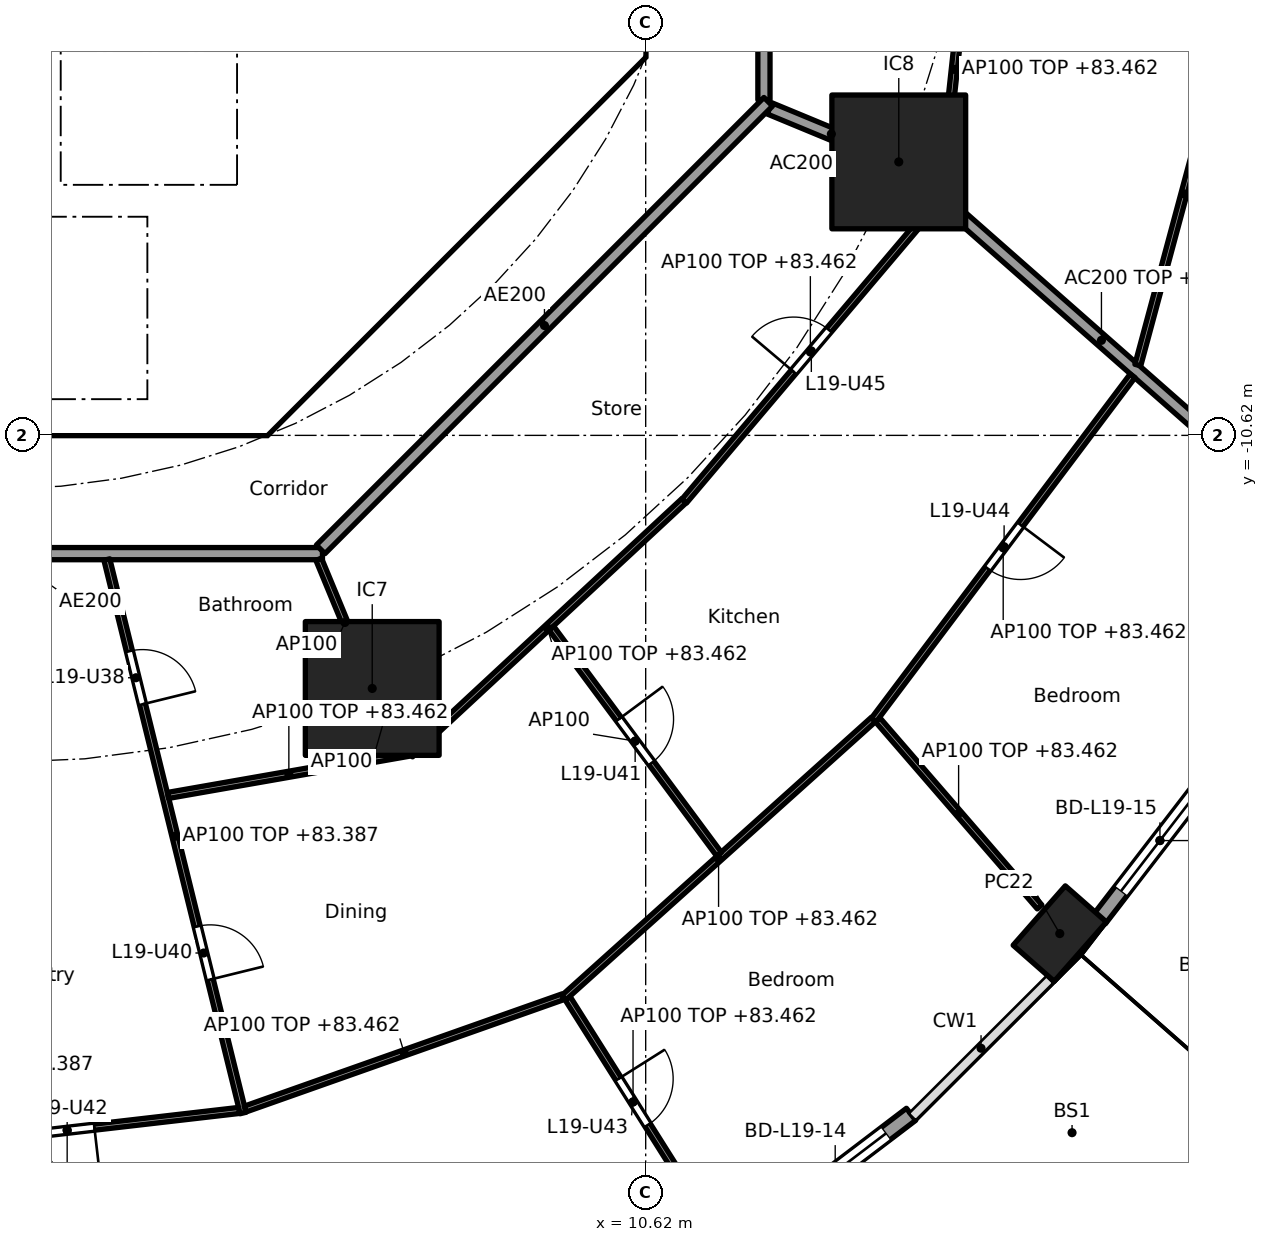
"""IFC4 building model, lengths in metres.
Left out: names, types, materials, properties, quantities, classifications, styles, units other than length and angle.
Written with IfcOpenShell. Run it as: python <this file> out.ifc"""

import sys

from ifc_helpers import new_model, si_unit, direction, frame, frame_2d, origin, origin_2d, place, context, subcontext, project, spatial, polyline, rectangle, hollow_rectangle, outline, extrude, element, fill, save


model = new_model("IFC4")
c1 = context("Model", 3, precision=1e-05, world=origin(), true_north=direction((0.0, 1.0)))
c2 = subcontext(c1, "Body", "Model", "MODEL_VIEW")
j1 = project(units=[si_unit("LENGTHUNIT", "METRE"), si_unit("PLANEANGLEUNIT", "RADIAN")], contexts=[c1])
p1 = place(None, origin())
s1 = spatial("IfcSite", under=j1, at=p1, CompositionType="ELEMENT")
p2 = place(p1, origin())
s2 = spatial("IfcBuilding", under=s1, at=p2, CompositionType="ELEMENT")
p3 = place(p2, frame((0.0, 0.0, 80.7)))
s3 = spatial("IfcBuildingStorey", under=s2, at=p3, CompositionType="ELEMENT", Elevation=80.7)
p4 = place(p3, frame((17.43, -18.813, 0.0), z_axis=(0.0, 0.0, 1.0), x_axis=(0.660114607735, 0.751164898445, 0.0)))
e1 = element("IfcColumn", 1, at=p4, inside=s3, PredefinedType="COLUMN", context=c2, shape_type="SweptSolid", body=[
    extrude(hollow_rectangle(XDim=1.3, YDim=0.9, WallThickness=0.045, at=origin_2d()), origin(), (0.0, 0.0, 1.0), 3.7),
])
for number, where, z_axis, x_axis in (
    (2, (6.123, -14.782, 0.0), (0.0, 0.0, 1.0), (1.0, 0.0, 0.0)),
    (3, (14.782, -6.123, 0.0), (0.0, 0.0, 1.0), (1.0, 0.0, 0.0)),
):
    element("IfcColumn", number, at=place(p3, frame(where, z_axis=z_axis, x_axis=x_axis)), inside=s3, PredefinedType="COLUMN", context=c2, shape_type="SweptSolid", body=[
        extrude(rectangle(XDim=2.2, YDim=2.2, at=origin_2d()), origin(), (0.0, 0.0, 1.0), 3.7),
    ])
p5 = place(p3, frame((14.984, -21.785, 0.0), z_axis=(0.0, 0.0, 1.0), x_axis=(-0.796037575978, -0.605247203736, 0.0)))
e4 = element("IfcWall", 4, at=p5, inside=s3, PredefinedType="SOLIDWALL", context=c2, shape_type="SweptSolid", body=[
    extrude(rectangle(XDim=3.134, YDim=0.25, at=frame_2d((1.567, 0.0))), origin(), (0.0, 0.0, 1.0), 3.44),
])
p6 = place(p5, frame((0.517, 0.0, 0.0)))
e5 = element("IfcOpeningElement", 5, at=p6, cuts=e4, PredefinedType="OPENING", context=c2, shape_type="SweptSolid", body=[
    extrude(rectangle(XDim=2.1, YDim=2.4, at=frame_2d((1.05, 1.2))), frame((0.0, 0.135, 0.0), z_axis=(0.0, -1.0, 0.0), x_axis=(1.0, 0.0, 0.0)), (0.0, 0.0, 1.0), 0.27),
])
p7 = place(p3, frame((20.073, -15.991, 0.0), z_axis=(0.0, 0.0, 1.0), x_axis=(-0.610458970322, -0.792047880847, 0.0)))
e6 = element("IfcWall", 6, at=p7, inside=s3, PredefinedType="SOLIDWALL", context=c2, shape_type="SweptSolid", body=[
    extrude(rectangle(XDim=3.263, YDim=0.25, at=frame_2d((1.631, 0.0))), origin(), (0.0, 0.0, 1.0), 3.44),
])
p8 = place(p7, frame((0.582, 0.0, 0.0)))
e7 = element("IfcOpeningElement", 7, at=p8, cuts=e6, PredefinedType="OPENING", context=c2, shape_type="SweptSolid", body=[
    extrude(rectangle(XDim=2.1, YDim=2.4, at=frame_2d((1.05, 1.2))), frame((0.0, 0.135, 0.0), z_axis=(0.0, -1.0, 0.0), x_axis=(1.0, 0.0, 0.0)), (0.0, 0.0, 1.0), 0.27),
])
p9 = place(p3, frame((4.613, -9.988, 0.0), z_axis=(0.0, 0.0, 1.0), x_axis=(0.707106781187, 0.707106781187, 0.0)))
e8 = element("IfcWall", 8, at=p9, inside=s3, PredefinedType="SHEAR", context=c2, shape_type="SweptSolid", body=[
    extrude(rectangle(XDim=7.602, YDim=0.6, at=frame_2d((3.801, 0.0))), origin(), (0.0, 0.0, 1.0), 3.44),
])
p10 = place(p9, frame((3.201, 0.0, 0.0)))
e9 = element("IfcOpeningElement", 9, at=p10, cuts=e8, PredefinedType="OPENING", context=c2, shape_type="SweptSolid", body=[
    extrude(rectangle(XDim=1.2, YDim=2.1, at=frame_2d((0.6, 1.05))), frame((0.0, 0.31, 0.0), z_axis=(0.0, -1.0, 0.0), x_axis=(1.0, 0.0, 0.0)), (0.0, 0.0, 1.0), 0.62),
])
p11 = place(p3, frame((4.0, -10.025, 0.0), z_axis=(0.0, 0.0, 1.0), x_axis=(0.0, 1.0, 0.0)))
e10 = element("IfcWall", 10, at=p11, inside=s3, PredefinedType="SOLIDWALL", context=c2, shape_type="SweptSolid", body=[
    extrude(rectangle(XDim=3.0, YDim=0.2, at=frame_2d((1.5, 0.0))), origin(), (0.0, 0.0, 1.0), 3.44),
])
p12 = place(p11, frame((0.975, 0.0, 0.0)))
e11 = element("IfcOpeningElement", 11, at=p12, cuts=e10, PredefinedType="OPENING", context=c2, shape_type="SweptSolid", body=[
    extrude(rectangle(XDim=1.1, YDim=2.1, at=frame_2d((0.55, 1.05))), frame((0.0, 0.11, 0.0), z_axis=(0.0, -1.0, 0.0), x_axis=(1.0, 0.0, 0.0)), (0.0, 0.0, 1.0), 0.22),
])
p13 = place(p3, frame((4.0, -6.5, 0.0), z_axis=(0.0, 0.0, 1.0), x_axis=(0.0, 1.0, 0.0)))
e12 = element("IfcWall", 12, at=p13, inside=s3, PredefinedType="SOLIDWALL", context=c2, shape_type="SweptSolid", body=[
    extrude(rectangle(XDim=2.2, YDim=0.2, at=frame_2d((1.1, 0.0))), origin(), (0.0, 0.0, 1.0), 3.44),
])
p14 = place(p13, frame((0.55, 0.0, 0.0)))
e13 = element("IfcOpeningElement", 13, at=p14, cuts=e12, PredefinedType="OPENING", context=c2, shape_type="SweptSolid", body=[
    extrude(rectangle(XDim=1.1, YDim=2.1, at=frame_2d((0.55, 1.05))), frame((0.0, 0.11, 0.0), z_axis=(0.0, -1.0, 0.0), x_axis=(1.0, 0.0, 0.0)), (0.0, 0.0, 1.0), 0.22),
])
p15 = place(p3, origin())
e14 = element("IfcWall", 14, at=p15, inside=s3, PredefinedType="SHEAR", context=c2, shape_type="SweptSolid", body=[
    extrude(outline(polyline([(-4.152, -10.025), (4.152, -10.025), (4.401, -9.776), (4.825, -10.2), (4.401, -10.625), (-4.401, -10.625), (-4.825, -10.2), (-4.401, -9.776), (-4.152, -10.025)])), origin(), (0.0, 0.0, 1.0), 3.44),
])
p16 = place(p3, origin())
e15 = element("IfcWall", 15, at=p16, inside=s3, PredefinedType="SHEAR", context=c2, shape_type="SweptSolid", body=[
    extrude(outline(polyline([(9.776, -4.401), (10.025, -4.152), (10.025, -3.801), (10.025, 4.152), (9.776, 4.401), (10.2, 4.825), (10.625, 4.401), (10.625, -4.401), (10.2, -4.825), (9.776, -4.401)])), origin(), (0.0, 0.0, 1.0), 3.44),
])
p17 = place(p3, frame((0.9, -6.5, 0.0), z_axis=(0.0, 0.0, 1.0), x_axis=(0.0, 1.0, 0.0)))
e16 = element("IfcWall", 16, at=p17, inside=s3, PredefinedType="SOLIDWALL", context=c2, shape_type="SweptSolid", body=[
    extrude(rectangle(XDim=2.2, YDim=0.2, at=frame_2d((1.1, 0.0))), origin(), (0.0, 0.0, 1.0), 3.44),
])
p18 = place(p3, origin())
e17 = element("IfcWall", 17, at=p18, inside=s3, PredefinedType="SOLIDWALL", context=c2, shape_type="SweptSolid", body=[
    extrude(outline(polyline([(4.1, -7.025), (-4.1, -7.025), (-4.1, -6.5), (4.1, -6.5), (4.1, -7.025)])), origin(), (0.0, 0.0, 1.0), 3.44),
])
p19 = place(p3, frame((12.657, -5.243, 0.0), z_axis=(0.0, 0.0, 1.0), x_axis=(0.923876145736, -0.382691608661, 0.0)))
e18 = element("IfcWall", 18, at=p19, inside=s3, PredefinedType="PARTITIONING", context=c2, shape_type="SweptSolid", body=[
    extrude(rectangle(XDim=2.2, YDim=0.2, at=frame_2d((1.1, 0.0))), origin(), (0.0, 0.0, 1.0), 3.44),
])
p20 = place(p3, frame((14.82, -6.156, 0.0), z_axis=(0.0, 0.0, 1.0), x_axis=(0.750582231659, -0.660777052808, 0.0)))
e19 = element("IfcWall", 19, at=p20, inside=s3, PredefinedType="PARTITIONING", context=c2, shape_type="SweptSolid", body=[
    extrude(rectangle(XDim=8.781, YDim=0.2, at=frame_2d((4.391, 0.0))), origin(), (0.0, 0.0, 1.0), 2.762),
])
p21 = place(p3, frame((12.565, -5.104, 0.0), z_axis=(0.0, 0.0, 1.0), x_axis=(0.0, 1.0, 0.0)))
e20 = element("IfcWall", 20, at=p21, inside=s3, PredefinedType="PARTITIONING", context=c2, shape_type="SweptSolid", body=[
    extrude(rectangle(XDim=10.209, YDim=0.2, at=frame_2d((5.104, 0.0))), origin(), (0.0, 0.0, 1.0), 3.44),
])
p22 = place(p21, frame((6.339, 0.0, 0.0)))
e21 = element("IfcOpeningElement", 21, at=p22, cuts=e20, PredefinedType="OPENING", context=c2, shape_type="SweptSolid", body=[
    extrude(rectangle(XDim=1.0, YDim=2.1, at=frame_2d((0.5, 1.05))), frame((0.0, 0.11, 0.0), z_axis=(0.0, -1.0, 0.0), x_axis=(1.0, 0.0, 0.0)), (0.0, 0.0, 1.0), 0.22),
])
p23 = place(p3, frame((-5.104, -12.565, 0.0), z_axis=(0.0, 0.0, 1.0), x_axis=(1.0, 0.0, 0.0)))
e22 = element("IfcWall", 22, at=p23, inside=s3, PredefinedType="PARTITIONING", context=c2, shape_type="SweptSolid", body=[
    extrude(rectangle(XDim=10.409, YDim=0.2, at=frame_2d((5.205, 0.0))), origin(), (0.0, 0.0, 1.0), 3.44),
])
p24 = place(p23, frame((4.604, 0.0, 0.0)))
e23 = element("IfcOpeningElement", 23, at=p24, cuts=e22, PredefinedType="OPENING", context=c2, shape_type="SweptSolid", body=[
    extrude(rectangle(XDim=1.0, YDim=2.1, at=frame_2d((0.5, 1.05))), frame((0.0, 0.11, 0.0), z_axis=(0.0, -1.0, 0.0), x_axis=(1.0, 0.0, 0.0)), (0.0, 0.0, 1.0), 0.22),
])
p25 = place(p3, frame((5.275, -12.494, 0.0), z_axis=(0.0, 0.0, 1.0), x_axis=(0.707106781187, 0.707106781187, 0.0)))
e24 = element("IfcWall", 24, at=p25, inside=s3, PredefinedType="PARTITIONING", context=c2, shape_type="SweptSolid", body=[
    extrude(rectangle(XDim=10.409, YDim=0.2, at=frame_2d((5.205, 0.0))), origin(), (0.0, 0.0, 1.0), 3.44),
])
p26 = place(p3, frame((-1.726, -22.375, 0.0), z_axis=(0.0, 0.0, 1.0), x_axis=(0.99339223329, 0.114768771187, 0.0)))
e25 = element("IfcWall", 25, at=p26, inside=s3, PredefinedType="PARTITIONING", context=c2, shape_type="SweptSolid", body=[
    extrude(rectangle(XDim=5.701, YDim=0.1, at=frame_2d((2.851, 0.0))), origin(), (0.0, 0.0, 1.0), 2.762),
])
p27 = place(p26, frame((2.4, 0.0, 0.0)))
e26 = element("IfcOpeningElement", 26, at=p27, cuts=e25, PredefinedType="OPENING", context=c2, shape_type="SweptSolid", body=[
    extrude(rectangle(XDim=0.9, YDim=2.1, at=frame_2d((0.45, 1.05))), frame((0.0, 0.06, 0.0), z_axis=(0.0, -1.0, 0.0), x_axis=(1.0, 0.0, 0.0)), (0.0, 0.0, 1.0), 0.12),
])
p28 = place(p3, frame((1.759, -12.662, 0.0), z_axis=(0.0, 0.0, 1.0), x_axis=(0.239022447434, -0.971014041929, 0.0)))
e27 = element("IfcWall", 27, at=p28, inside=s3, PredefinedType="PARTITIONING", context=c2, shape_type="SweptSolid", body=[
    extrude(rectangle(XDim=9.374, YDim=0.1, at=frame_2d((4.687, 0.0))), origin(), (0.0, 0.0, 1.0), 2.687),
])
p29 = place(p28, frame((1.552, 0.0, 0.0)))
e28 = element("IfcOpeningElement", 28, at=p29, cuts=e27, PredefinedType="OPENING", context=c2, shape_type="SweptSolid", body=[
    extrude(rectangle(XDim=0.9, YDim=2.1, at=frame_2d((0.45, 1.05))), frame((0.0, 0.06, 0.0), z_axis=(0.0, -1.0, 0.0), x_axis=(1.0, 0.0, 0.0)), (0.0, 0.0, 1.0), 0.12),
])
p30 = place(p28, frame((6.214, 0.0, 0.0)))
e29 = element("IfcOpeningElement", 29, at=p30, cuts=e27, PredefinedType="OPENING", context=c2, shape_type="SweptSolid", body=[
    extrude(rectangle(XDim=0.9, YDim=2.1, at=frame_2d((0.45, 1.05))), frame((0.0, 0.06, 0.0), z_axis=(0.0, -1.0, 0.0), x_axis=(1.0, 0.0, 0.0)), (0.0, 0.0, 1.0), 0.12),
])
p31 = place(p3, frame((2.765, -16.541, 0.0), z_axis=(0.0, 0.0, 1.0), x_axis=(0.985002709003, 0.172538874623, 0.0)))
e30 = element("IfcWall", 30, at=p31, inside=s3, PredefinedType="PARTITIONING", context=c2, shape_type="SweptSolid", body=[
    extrude(rectangle(XDim=4.034, YDim=0.1, at=frame_2d((2.017, 0.0))), origin(), (0.0, 0.0, 1.0), 2.762),
])
p32 = place(p3, frame((4.034, -21.698, 0.0), z_axis=(0.0, 0.0, 1.0), x_axis=(0.942864271692, 0.333177077794, 0.0)))
e31 = element("IfcWall", 31, at=p32, inside=s3, PredefinedType="PARTITIONING", context=c2, shape_type="SweptSolid", body=[
    extrude(rectangle(XDim=5.545, YDim=0.1, at=frame_2d((2.772, 0.0))), origin(), (0.0, 0.0, 1.0), 2.762),
])
p33 = place(p3, frame((5.243, -12.657, 0.0), z_axis=(0.0, 0.0, 1.0), x_axis=(0.382719158442, -0.923864733477, 0.0)))
e32 = element("IfcWall", 32, at=p33, inside=s3, PredefinedType="PARTITIONING", context=c2, shape_type="SweptSolid", body=[
    extrude(rectangle(XDim=2.25, YDim=0.1, at=frame_2d((1.125, 0.0))), origin(), (0.0, 0.0, 1.0), 3.44),
])
p34 = place(p3, frame((6.751, -15.87, 0.0), z_axis=(0.0, 0.0, 1.0), x_axis=(0.733003105791, 0.680225291283, 0.0)))
e33 = element("IfcWall", 33, at=p34, inside=s3, PredefinedType="PARTITIONING", context=c2, shape_type="SweptSolid", body=[
    extrude(rectangle(XDim=6.138, YDim=0.1, at=frame_2d((3.069, 0.0))), origin(), (0.0, 0.0, 1.0), 2.762),
])
p35 = place(p3, frame((9.336, -19.877, 0.0), z_axis=(0.0, 0.0, 1.0), x_axis=(0.533525984139, -0.845783674617, 0.0)))
e34 = element("IfcWall", 34, at=p35, inside=s3, PredefinedType="PARTITIONING", context=c2, shape_type="SweptSolid", body=[
    extrude(rectangle(XDim=4.033, YDim=0.1, at=frame_2d((2.016, 0.0))), origin(), (0.0, 0.0, 1.0), 2.762),
])
p36 = place(p35, frame((1.566, 0.0, 0.0)))
e35 = element("IfcOpeningElement", 35, at=p36, cuts=e34, PredefinedType="OPENING", context=c2, shape_type="SweptSolid", body=[
    extrude(rectangle(XDim=0.9, YDim=2.1, at=frame_2d((0.45, 1.05))), frame((0.0, 0.06, 0.0), z_axis=(0.0, -1.0, 0.0), x_axis=(1.0, 0.0, 0.0)), (0.0, 0.0, 1.0), 0.12),
])
p37 = place(p3, frame((9.272, -19.868, 0.0), z_axis=(0.0, 0.0, 1.0), x_axis=(0.743884413566, 0.668308296562, 0.0)))
e36 = element("IfcWall", 36, at=p37, inside=s3, PredefinedType="PARTITIONING", context=c2, shape_type="SweptSolid", body=[
    extrude(rectangle(XDim=6.845, YDim=0.1, at=frame_2d((3.423, 0.0))), origin(), (0.0, 0.0, 1.0), 2.762),
])
p38 = place(p3, frame((9.067, -13.789, 0.0), z_axis=(0.0, 0.0, 1.0), x_axis=(0.5958491185, -0.80309640018, 0.0)))
e37 = element("IfcWall", 37, at=p38, inside=s3, PredefinedType="PARTITIONING", context=c2, shape_type="SweptSolid", body=[
    extrude(rectangle(XDim=4.63, YDim=0.1, at=frame_2d((2.315, 0.0))), origin(), (0.0, 0.0, 1.0), 3.44),
])
p39 = place(p38, frame((1.865, 0.0, 0.0)))
e38 = element("IfcOpeningElement", 38, at=p39, cuts=e37, PredefinedType="OPENING", context=c2, shape_type="SweptSolid", body=[
    extrude(rectangle(XDim=0.9, YDim=2.1, at=frame_2d((0.45, 1.05))), frame((0.0, 0.06, 0.0), z_axis=(0.0, -1.0, 0.0), x_axis=(1.0, 0.0, 0.0)), (0.0, 0.0, 1.0), 0.12),
])
p40 = place(p3, frame((11.255, -11.699, 0.0), z_axis=(0.0, 0.0, 1.0), x_axis=(0.646107653745, 0.763246290375, 0.0)))
e39 = element("IfcWall", 39, at=p40, inside=s3, PredefinedType="PARTITIONING", context=c2, shape_type="SweptSolid", body=[
    extrude(rectangle(XDim=6.417, YDim=0.1, at=frame_2d((3.208, 0.0))), origin(), (0.0, 0.0, 1.0), 2.762),
])
p41 = place(p40, frame((2.784, 0.0, 0.0)))
e40 = element("IfcOpeningElement", 40, at=p41, cuts=e39, PredefinedType="OPENING", context=c2, shape_type="SweptSolid", body=[
    extrude(rectangle(XDim=0.9, YDim=2.1, at=frame_2d((0.45, 1.05))), frame((0.0, 0.06, 0.0), z_axis=(0.0, -1.0, 0.0), x_axis=(1.0, 0.0, 0.0)), (0.0, 0.0, 1.0), 0.12),
])
p42 = place(p3, frame((14.435, -15.297, 0.0), z_axis=(0.0, 0.0, 1.0), x_axis=(0.654405107766, -0.756144136345, 0.0)))
e41 = element("IfcWall", 41, at=p42, inside=s3, PredefinedType="PARTITIONING", context=c2, shape_type="SweptSolid", body=[
    extrude(rectangle(XDim=4.07, YDim=0.1, at=frame_2d((2.035, 0.0))), origin(), (0.0, 0.0, 1.0), 2.762),
])
p43 = place(p3, frame((14.372, -15.3, 0.0), z_axis=(0.0, 0.0, 1.0), x_axis=(0.600987107857, 0.79925871668, 0.0)))
e42 = element("IfcWall", 42, at=p43, inside=s3, PredefinedType="PARTITIONING", context=c2, shape_type="SweptSolid", body=[
    extrude(rectangle(XDim=7.08, YDim=0.1, at=frame_2d((3.54, 0.0))), origin(), (0.0, 0.0, 1.0), 2.762),
])
p44 = place(p43, frame((3.115, 0.0, 0.0)))
e43 = element("IfcOpeningElement", 43, at=p44, cuts=e42, PredefinedType="OPENING", context=c2, shape_type="SweptSolid", body=[
    extrude(rectangle(XDim=0.9, YDim=2.1, at=frame_2d((0.45, 1.05))), frame((0.0, 0.06, 0.0), z_axis=(0.0, -1.0, 0.0), x_axis=(1.0, 0.0, 0.0)), (0.0, 0.0, 1.0), 0.12),
])
p45 = place(p3, frame((15.477, -6.625, 0.0), z_axis=(0.0, 0.0, 1.0), x_axis=(0.107561928907, 0.994198386365, 0.0)))
e44 = element("IfcWall", 44, at=p45, inside=s3, PredefinedType="PARTITIONING", context=c2, shape_type="SweptSolid", body=[
    extrude(rectangle(XDim=4.072, YDim=0.1, at=frame_2d((2.036, 0.0))), origin(), (0.0, 0.0, 1.0), 2.762),
])
p46 = place(p3, frame((18.713, -9.464, 0.0), z_axis=(0.0, 0.0, 1.0), x_axis=(0.260279646259, 0.965533275316, 0.0)))
e45 = element("IfcWall", 45, at=p46, inside=s3, PredefinedType="PARTITIONING", context=c2, shape_type="SweptSolid", body=[
    extrude(rectangle(XDim=5.833, YDim=0.1, at=frame_2d((2.917, 0.0))), origin(), (0.0, 0.0, 1.0), 2.762),
])
p47 = place(p3, frame((6.051, -14.855, 0.0), z_axis=(0.0, 0.0, 1.0), x_axis=(0.533542828537, -0.845773048824, 0.0)))
e46 = element("IfcWall", 46, at=p47, inside=s3, PredefinedType="PARTITIONING", context=c2, shape_type="SweptSolid", body=[
    extrude(rectangle(XDim=1.021, YDim=0.1, at=frame_2d((0.51, 0.0))), origin(), (0.0, 0.0, 1.0), 3.44),
])
p48 = place(p6, origin())
e47 = element("IfcDoor", 47, at=p48, inside=s3, OperationType="SLIDING_TO_LEFT", PredefinedType="DOOR", context=c2, shape_type="SweptSolid", body=[
    extrude(rectangle(XDim=2.1, YDim=2.4, at=frame_2d((1.05, 1.2))), frame((0.0, 0.025, 0.0), z_axis=(0.0, -1.0, 0.0), x_axis=(1.0, 0.0, 0.0)), (0.0, 0.0, 1.0), 0.05),
])
fill(e5, e47)
p49 = place(p8, origin())
e48 = element("IfcDoor", 48, at=p49, inside=s3, OperationType="SLIDING_TO_LEFT", PredefinedType="DOOR", context=c2, shape_type="SweptSolid", body=[
    extrude(rectangle(XDim=2.1, YDim=2.4, at=frame_2d((1.05, 1.2))), frame((0.0, 0.025, 0.0), z_axis=(0.0, -1.0, 0.0), x_axis=(1.0, 0.0, 0.0)), (0.0, 0.0, 1.0), 0.05),
])
fill(e7, e48)
p50 = place(p14, origin())
e49 = element("IfcDoor", 49, at=p50, inside=s3, OperationType="DOUBLE_DOOR_SLIDING", PredefinedType="DOOR", context=c2, shape_type="SweptSolid", body=[
    extrude(rectangle(XDim=1.1, YDim=2.1, at=frame_2d((0.55, 1.05))), frame((0.0, 0.025, 0.0), z_axis=(0.0, -1.0, 0.0), x_axis=(1.0, 0.0, 0.0)), (0.0, 0.0, 1.0), 0.05),
])
fill(e13, e49)
p51 = place(p12, origin())
e50 = element("IfcDoor", 50, at=p51, inside=s3, OperationType="SINGLE_SWING_RIGHT", PredefinedType="DOOR", context=c2, shape_type="SweptSolid", body=[
    extrude(rectangle(XDim=1.1, YDim=2.1, at=frame_2d((0.55, 1.05))), frame((0.0, 0.025, 0.0), z_axis=(0.0, -1.0, 0.0), x_axis=(1.0, 0.0, 0.0)), (0.0, 0.0, 1.0), 0.05),
])
fill(e11, e50)
p52 = place(p10, origin())
e51 = element("IfcDoor", 51, at=p52, inside=s3, OperationType="SINGLE_SWING_LEFT", PredefinedType="DOOR", context=c2, shape_type="SweptSolid", body=[
    extrude(rectangle(XDim=1.2, YDim=2.1, at=frame_2d((0.6, 1.05))), frame((0.0, 0.025, 0.0), z_axis=(0.0, -1.0, 0.0), x_axis=(1.0, 0.0, 0.0)), (0.0, 0.0, 1.0), 0.05),
])
fill(e9, e51)
p53 = place(p29, origin())
e52 = element("IfcDoor", 52, at=p53, inside=s3, OperationType="SINGLE_SWING_RIGHT", PredefinedType="DOOR", context=c2, shape_type="SweptSolid", body=[
    extrude(rectangle(XDim=0.9, YDim=2.1, at=frame_2d((0.45, 1.05))), frame((0.0, 0.025, 0.0), z_axis=(0.0, -1.0, 0.0), x_axis=(1.0, 0.0, 0.0)), (0.0, 0.0, 1.0), 0.05),
])
fill(e28, e52)
p54 = place(p30, origin())
e53 = element("IfcDoor", 53, at=p54, inside=s3, OperationType="SINGLE_SWING_RIGHT", PredefinedType="DOOR", context=c2, shape_type="SweptSolid", body=[
    extrude(rectangle(XDim=0.9, YDim=2.1, at=frame_2d((0.45, 1.05))), frame((0.0, 0.025, 0.0), z_axis=(0.0, -1.0, 0.0), x_axis=(1.0, 0.0, 0.0)), (0.0, 0.0, 1.0), 0.05),
])
fill(e29, e53)
p55 = place(p39, origin())
e54 = element("IfcDoor", 54, at=p55, inside=s3, OperationType="SINGLE_SWING_LEFT", PredefinedType="DOOR", context=c2, shape_type="SweptSolid", body=[
    extrude(rectangle(XDim=0.9, YDim=2.1, at=frame_2d((0.45, 1.05))), frame((0.0, 0.025, 0.0), z_axis=(0.0, -1.0, 0.0), x_axis=(1.0, 0.0, 0.0)), (0.0, 0.0, 1.0), 0.05),
])
fill(e38, e54)
p56 = place(p27, frame((0.9, 0.0, 0.0), x_axis=(-1.0, 0.0, 0.0)))
e55 = element("IfcDoor", 55, at=p56, inside=s3, OperationType="SINGLE_SWING_LEFT", PredefinedType="DOOR", context=c2, shape_type="SweptSolid", body=[
    extrude(rectangle(XDim=0.9, YDim=2.1, at=frame_2d((0.45, 1.05))), frame((0.0, 0.025, 0.0), z_axis=(0.0, -1.0, 0.0), x_axis=(1.0, 0.0, 0.0)), (0.0, 0.0, 1.0), 0.05),
])
fill(e26, e55)
p57 = place(p36, origin())
e56 = element("IfcDoor", 56, at=p57, inside=s3, OperationType="SINGLE_SWING_LEFT", PredefinedType="DOOR", context=c2, shape_type="SweptSolid", body=[
    extrude(rectangle(XDim=0.9, YDim=2.1, at=frame_2d((0.45, 1.05))), frame((0.0, 0.025, 0.0), z_axis=(0.0, -1.0, 0.0), x_axis=(1.0, 0.0, 0.0)), (0.0, 0.0, 1.0), 0.05),
])
fill(e35, e56)
p58 = place(p44, frame((0.9, 0.0, 0.0), x_axis=(-1.0, 0.0, 0.0)))
e57 = element("IfcDoor", 57, at=p58, inside=s3, OperationType="SINGLE_SWING_LEFT", PredefinedType="DOOR", context=c2, shape_type="SweptSolid", body=[
    extrude(rectangle(XDim=0.9, YDim=2.1, at=frame_2d((0.45, 1.05))), frame((0.0, 0.025, 0.0), z_axis=(0.0, -1.0, 0.0), x_axis=(1.0, 0.0, 0.0)), (0.0, 0.0, 1.0), 0.05),
])
fill(e43, e57)
p59 = place(p41, origin())
e58 = element("IfcDoor", 58, at=p59, inside=s3, OperationType="SINGLE_SWING_LEFT", PredefinedType="DOOR", context=c2, shape_type="SweptSolid", body=[
    extrude(rectangle(XDim=0.9, YDim=2.1, at=frame_2d((0.45, 1.05))), frame((0.0, 0.025, 0.0), z_axis=(0.0, -1.0, 0.0), x_axis=(1.0, 0.0, 0.0)), (0.0, 0.0, 1.0), 0.05),
])
fill(e40, e58)
save(model, sys.argv[1])
